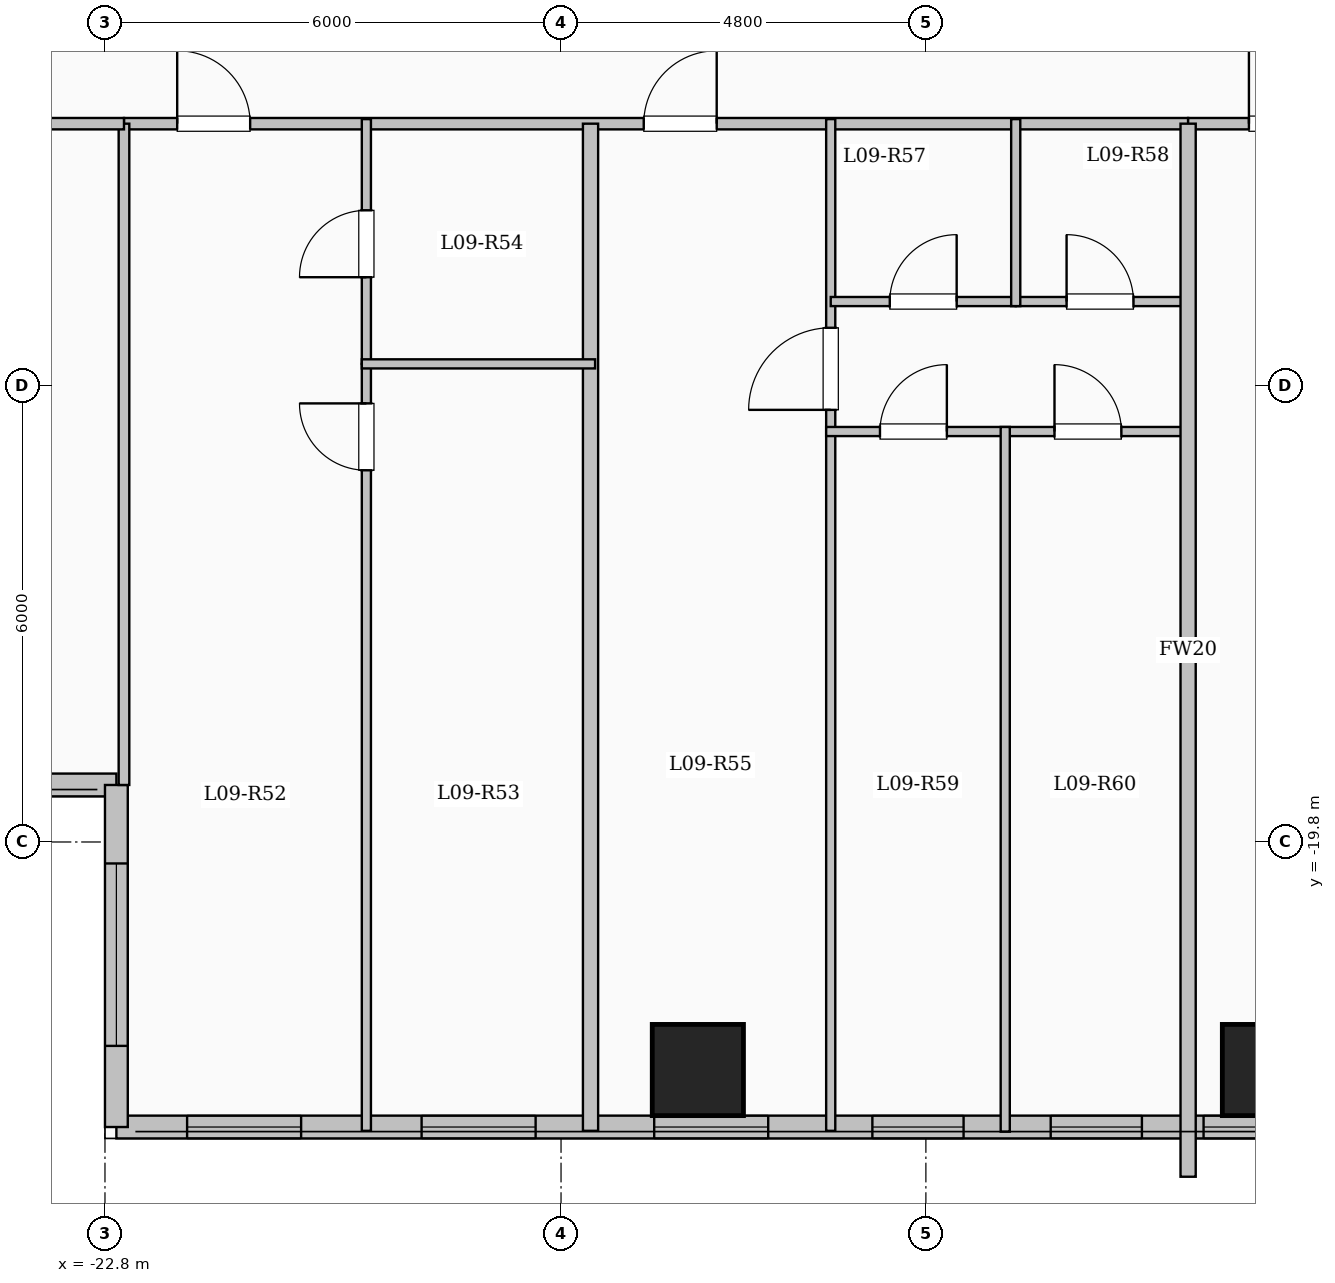
"""IFC4 building model, lengths in metres.
Left out: names, types, materials, properties, quantities, classifications, styles, units other than length and angle.
Written with IfcOpenShell. Run it as: python <this file> out.ifc"""

import sys

from ifc_helpers import new_model, si_unit, direction, frame, frame_2d, origin, origin_2d, place, context, subcontext, project, spatial, rectangle, extrude, element, fill, save


model = new_model("IFC4")
c1 = context("Model", 3, precision=1e-05, world=origin(), true_north=direction((0.0, 1.0)))
c2 = subcontext(c1, "Body", "Model", "MODEL_VIEW")
j1 = project(units=[si_unit("LENGTHUNIT", "METRE"), si_unit("PLANEANGLEUNIT", "RADIAN")], contexts=[c1])
p1 = place(None, origin())
s1 = spatial("IfcSite", under=j1, at=p1, CompositionType="ELEMENT")
p2 = place(p1, origin())
s2 = spatial("IfcBuilding", under=s1, at=p2, CompositionType="ELEMENT")
p3 = place(p2, frame((0.0, 0.0, 37.4)))
s3 = spatial("IfcBuildingStorey", under=s2, at=p3, CompositionType="ELEMENT", Elevation=37.4)
for number, where, z_axis, x_axis in (
    (1, (-15.0, -22.8, 0.0), (0.0, 0.0, 1.0), (1.0, 0.0, 0.0)),
    (2, (-7.5, -22.8, 0.0), (0.0, 0.0, 1.0), (1.0, 0.0, 0.0)),
):
    element("IfcColumn", number, at=place(p3, frame(where, z_axis=z_axis, x_axis=x_axis)), inside=s3, PredefinedType="COLUMN", context=c2, shape_type="SweptSolid", body=[
        extrude(rectangle(XDim=1.2, YDim=1.2, at=origin_2d()), origin(), (0.0, 0.0, 1.0), 3.35),
    ])
p4 = place(p3, frame((-22.65, -19.05, 0.0), z_axis=(0.0, 0.0, 1.0), x_axis=(-1.0, 0.0, 0.0)))
e3 = element("IfcWall", 3, at=p4, inside=s3, PredefinedType="SOLIDWALL", context=c2, shape_type="SweptSolid", body=[
    extrude(rectangle(XDim=6.0, YDim=0.3, at=frame_2d((3.0, 0.0))), origin(), (0.0, 0.0, 1.0), 3.1),
])
p5 = place(p4, frame((1.775, 0.0, 0.9)))
e4 = element("IfcOpeningElement", 4, at=p5, cuts=e3, PredefinedType="OPENING", context=c2, shape_type="SweptSolid", body=[
    extrude(rectangle(XDim=2.4, YDim=1.8, at=frame_2d((1.2, 0.9))), frame((0.0, 0.16, 0.0), z_axis=(0.0, -1.0, 0.0), x_axis=(1.0, 0.0, 0.0)), (0.0, 0.0, 1.0), 0.32),
])
p6 = place(p3, frame((-7.35, -23.55, 0.0), z_axis=(0.0, 0.0, 1.0), x_axis=(-1.0, 0.0, 0.0)))
e5 = element("IfcWall", 5, at=p6, inside=s3, PredefinedType="SOLIDWALL", context=c2, shape_type="SweptSolid", body=[
    extrude(rectangle(XDim=15.3, YDim=0.3, at=frame_2d((7.65, 0.0))), origin(), (0.0, 0.0, 1.0), 3.1),
])
p7 = place(p6, frame((0.147, 0.0, 0.95)))
e6 = element("IfcOpeningElement", 6, at=p7, cuts=e5, PredefinedType="OPENING", context=c2, shape_type="SweptSolid", body=[
    extrude(rectangle(XDim=0.85, YDim=1.5, at=frame_2d((0.425, 0.75))), frame((0.0, 0.16, 0.0), z_axis=(0.0, -1.0, 0.0), x_axis=(1.0, 0.0, 0.0)), (0.0, 0.0, 1.0), 0.32),
])
p8 = place(p6, frame((1.808, 0.0, 0.95)))
e7 = element("IfcOpeningElement", 7, at=p8, cuts=e5, PredefinedType="OPENING", context=c2, shape_type="SweptSolid", body=[
    extrude(rectangle(XDim=1.2, YDim=1.5, at=frame_2d((0.6, 0.75))), frame((0.0, 0.16, 0.0), z_axis=(0.0, -1.0, 0.0), x_axis=(1.0, 0.0, 0.0)), (0.0, 0.0, 1.0), 0.32),
])
p9 = place(p6, frame((4.154, 0.0, 0.95)))
e8 = element("IfcOpeningElement", 8, at=p9, cuts=e5, PredefinedType="OPENING", context=c2, shape_type="SweptSolid", body=[
    extrude(rectangle(XDim=1.2, YDim=1.5, at=frame_2d((0.6, 0.75))), frame((0.0, 0.16, 0.0), z_axis=(0.0, -1.0, 0.0), x_axis=(1.0, 0.0, 0.0)), (0.0, 0.0, 1.0), 0.32),
])
p10 = place(p6, frame((6.724, 0.0, 0.9)))
e9 = element("IfcOpeningElement", 9, at=p10, cuts=e5, PredefinedType="OPENING", context=c2, shape_type="SweptSolid", body=[
    extrude(rectangle(XDim=1.5, YDim=1.65, at=frame_2d((0.75, 0.825))), frame((0.0, 0.16, 0.0), z_axis=(0.0, -1.0, 0.0), x_axis=(1.0, 0.0, 0.0)), (0.0, 0.0, 1.0), 0.32),
])
p11 = place(p6, frame((9.784, 0.0, 0.9)))
e10 = element("IfcOpeningElement", 10, at=p11, cuts=e5, PredefinedType="OPENING", context=c2, shape_type="SweptSolid", body=[
    extrude(rectangle(XDim=1.5, YDim=1.65, at=frame_2d((0.75, 0.825))), frame((0.0, 0.16, 0.0), z_axis=(0.0, -1.0, 0.0), x_axis=(1.0, 0.0, 0.0)), (0.0, 0.0, 1.0), 0.32),
])
p12 = place(p6, frame((12.869, 0.0, 0.9)))
e11 = element("IfcOpeningElement", 11, at=p12, cuts=e5, PredefinedType="OPENING", context=c2, shape_type="SweptSolid", body=[
    extrude(rectangle(XDim=1.5, YDim=1.65, at=frame_2d((0.75, 0.825))), frame((0.0, 0.16, 0.0), z_axis=(0.0, -1.0, 0.0), x_axis=(1.0, 0.0, 0.0)), (0.0, 0.0, 1.0), 0.32),
])
p13 = place(p3, frame((-22.65, -23.55, 0.0), z_axis=(0.0, 0.0, 1.0), x_axis=(0.0, 1.0, 0.0)))
e12 = element("IfcWall", 12, at=p13, inside=s3, PredefinedType="SOLIDWALL", context=c2, shape_type="SweptSolid", body=[
    extrude(rectangle(XDim=4.5, YDim=0.3, at=frame_2d((2.25, 0.0))), origin(), (0.0, 0.0, 1.0), 3.1),
])
p14 = place(p13, frame((1.067, 0.0, 0.9)))
e13 = element("IfcOpeningElement", 13, at=p14, cuts=e12, PredefinedType="OPENING", context=c2, shape_type="SweptSolid", body=[
    extrude(rectangle(XDim=2.4, YDim=1.8, at=frame_2d((1.2, 0.9))), frame((0.0, 0.16, 0.0), z_axis=(0.0, -1.0, 0.0), x_axis=(1.0, 0.0, 0.0)), (0.0, 0.0, 1.0), 0.32),
])
p15 = place(p3, frame((-22.55, -10.35, 0.0), z_axis=(0.0, 0.0, 1.0), x_axis=(1.0, 0.0, 0.0)))
e14 = element("IfcWall", 14, at=p15, inside=s3, PredefinedType="PARTITIONING", context=c2, shape_type="SweptSolid", body=[
    extrude(rectangle(XDim=14.0, YDim=0.15, at=frame_2d((7.0, 0.0))), origin(), (0.0, 0.0, 1.0), 3.1),
])
p16 = place(p15, frame((0.7, 0.0, 0.0)))
e15 = element("IfcOpeningElement", 15, at=p16, cuts=e14, PredefinedType="OPENING", context=c2, shape_type="SweptSolid", body=[
    extrude(rectangle(XDim=0.96, YDim=2.15, at=frame_2d((0.48, 1.075))), frame((0.0, 0.085, 0.0), z_axis=(0.0, -1.0, 0.0), x_axis=(1.0, 0.0, 0.0)), (0.0, 0.0, 1.0), 0.17),
])
p17 = place(p15, frame((6.838, 0.0, 0.0)))
e16 = element("IfcOpeningElement", 16, at=p17, cuts=e14, PredefinedType="OPENING", context=c2, shape_type="SweptSolid", body=[
    extrude(rectangle(XDim=0.96, YDim=2.15, at=frame_2d((0.48, 1.075))), frame((0.0, 0.085, 0.0), z_axis=(0.0, -1.0, 0.0), x_axis=(1.0, 0.0, 0.0)), (0.0, 0.0, 1.0), 0.17),
])
p18 = place(p3, frame((-8.55, -10.35, 0.0), z_axis=(0.0, 0.0, 1.0), x_axis=(1.0, 0.0, 0.0)))
e17 = element("IfcWall", 17, at=p18, inside=s3, PredefinedType="PARTITIONING", context=c2, shape_type="SweptSolid", body=[
    extrude(rectangle(XDim=17.1, YDim=0.15, at=frame_2d((8.55, 0.0))), origin(), (0.0, 0.0, 1.0), 3.1),
])
p19 = place(p18, frame((0.8, 0.0, 0.0)))
e18 = element("IfcOpeningElement", 18, at=p19, cuts=e17, PredefinedType="OPENING", context=c2, shape_type="SweptSolid", body=[
    extrude(rectangle(XDim=0.96, YDim=2.15, at=frame_2d((0.48, 1.075))), frame((0.0, 0.085, 0.0), z_axis=(0.0, -1.0, 0.0), x_axis=(1.0, 0.0, 0.0)), (0.0, 0.0, 1.0), 0.17),
])
p20 = place(p3, frame((-16.412, -23.6, 0.0), z_axis=(0.0, 0.0, 1.0), x_axis=(0.0, 1.0, 0.0)))
e19 = element("IfcWall", 19, at=p20, inside=s3, PredefinedType="SOLIDWALL", context=c2, shape_type="SweptSolid", body=[
    extrude(rectangle(XDim=13.25, YDim=0.2, at=frame_2d((6.625, 0.0))), origin(), (0.0, 0.0, 1.0), 3.1),
])
p21 = place(p3, frame((-19.361, -23.6, 0.0), z_axis=(0.0, 0.0, 1.0), x_axis=(0.0, 1.0, 0.0)))
e20 = element("IfcWall", 20, at=p21, inside=s3, PredefinedType="PARTITIONING", context=c2, shape_type="SweptSolid", body=[
    extrude(rectangle(XDim=10.09, YDim=0.12, at=frame_2d((5.045, 0.0))), origin(), (0.0, 0.0, 1.0), 3.1),
])
p22 = place(p21, frame((8.69, 0.0, 0.0)))
e21 = element("IfcOpeningElement", 21, at=p22, cuts=e20, PredefinedType="OPENING", context=c2, shape_type="SweptSolid", body=[
    extrude(rectangle(XDim=0.88, YDim=2.1, at=frame_2d((0.44, 1.05))), frame((0.0, 0.07, 0.0), z_axis=(0.0, -1.0, 0.0), x_axis=(1.0, 0.0, 0.0)), (0.0, 0.0, 1.0), 0.14),
])
p23 = place(p3, frame((-19.361, -13.51, 0.0), z_axis=(0.0, 0.0, 1.0), x_axis=(0.0, 1.0, 0.0)))
e22 = element("IfcWall", 22, at=p23, inside=s3, PredefinedType="PARTITIONING", context=c2, shape_type="SweptSolid", body=[
    extrude(rectangle(XDim=3.22, YDim=0.12, at=frame_2d((1.61, 0.0))), origin(), (0.0, 0.0, 1.0), 3.1),
])
p24 = place(p23, frame((1.14, 0.0, 0.0)))
e23 = element("IfcOpeningElement", 23, at=p24, cuts=e22, PredefinedType="OPENING", context=c2, shape_type="SweptSolid", body=[
    extrude(rectangle(XDim=0.88, YDim=2.1, at=frame_2d((0.44, 1.05))), frame((0.0, 0.07, 0.0), z_axis=(0.0, -1.0, 0.0), x_axis=(1.0, 0.0, 0.0)), (0.0, 0.0, 1.0), 0.14),
])
p25 = place(p3, frame((-19.421, -13.51, 0.0), z_axis=(0.0, 0.0, 1.0), x_axis=(1.0, 0.0, 0.0)))
e24 = element("IfcWall", 24, at=p25, inside=s3, PredefinedType="PARTITIONING", context=c2, shape_type="SweptSolid", body=[
    extrude(rectangle(XDim=3.069, YDim=0.12, at=frame_2d((1.534, 0.0))), origin(), (0.0, 0.0, 1.0), 3.1),
])
p26 = place(p3, frame((-13.252, -23.6, 0.0), z_axis=(0.0, 0.0, 1.0), x_axis=(0.0, 1.0, 0.0)))
e25 = element("IfcWall", 25, at=p26, inside=s3, PredefinedType="PARTITIONING", context=c2, shape_type="SweptSolid", body=[
    extrude(rectangle(XDim=13.31, YDim=0.12, at=frame_2d((6.655, 0.0))), origin(), (0.0, 0.0, 1.0), 3.1),
])
p27 = place(p26, frame((9.485, 0.0, 0.0)))
e26 = element("IfcOpeningElement", 26, at=p27, cuts=e25, PredefinedType="OPENING", context=c2, shape_type="SweptSolid", body=[
    extrude(rectangle(XDim=1.08, YDim=2.15, at=frame_2d((0.54, 1.075))), frame((0.0, 0.07, 0.0), z_axis=(0.0, -1.0, 0.0), x_axis=(1.0, 0.0, 0.0)), (0.0, 0.0, 1.0), 0.14),
])
p28 = place(p3, frame((-13.252, -12.69, 0.0), z_axis=(0.0, 0.0, 1.0), x_axis=(1.0, 0.0, 0.0)))
e27 = element("IfcWall", 27, at=p28, inside=s3, PredefinedType="PARTITIONING", context=c2, shape_type="SweptSolid", body=[
    extrude(rectangle(XDim=2.434, YDim=0.12, at=frame_2d((1.217, 0.0))), origin(), (0.0, 0.0, 1.0), 2.585),
])
p29 = place(p28, frame((0.777, 0.0, 0.0)))
e28 = element("IfcOpeningElement", 28, at=p29, cuts=e27, PredefinedType="OPENING", context=c2, shape_type="SweptSolid", body=[
    extrude(rectangle(XDim=0.88, YDim=2.1, at=frame_2d((0.44, 1.05))), frame((0.0, 0.07, 0.0), z_axis=(0.0, -1.0, 0.0), x_axis=(1.0, 0.0, 0.0)), (0.0, 0.0, 1.0), 0.14),
])
p30 = place(p3, frame((-10.818, -12.69, 0.0), z_axis=(0.0, 0.0, 1.0), x_axis=(1.0, 0.0, 0.0)))
e29 = element("IfcWall", 29, at=p30, inside=s3, PredefinedType="PARTITIONING", context=c2, shape_type="SweptSolid", body=[
    extrude(rectangle(XDim=2.218, YDim=0.12, at=frame_2d((1.109, 0.0))), origin(), (0.0, 0.0, 1.0), 2.585),
])
p31 = place(p30, frame((0.669, 0.0, 0.0)))
e30 = element("IfcOpeningElement", 30, at=p31, cuts=e29, PredefinedType="OPENING", context=c2, shape_type="SweptSolid", body=[
    extrude(rectangle(XDim=0.88, YDim=2.1, at=frame_2d((0.44, 1.05))), frame((0.0, 0.07, 0.0), z_axis=(0.0, -1.0, 0.0), x_axis=(1.0, 0.0, 0.0)), (0.0, 0.0, 1.0), 0.14),
])
p32 = place(p3, frame((-13.312, -14.4, 0.0), z_axis=(0.0, 0.0, 1.0), x_axis=(1.0, 0.0, 0.0)))
e31 = element("IfcWall", 31, at=p32, inside=s3, PredefinedType="PARTITIONING", context=c2, shape_type="SweptSolid", body=[
    extrude(rectangle(XDim=4.772, YDim=0.12, at=frame_2d((2.386, 0.0))), origin(), (0.0, 0.0, 1.0), 3.1),
])
p33 = place(p32, frame((0.708, 0.0, 0.0)))
e32 = element("IfcOpeningElement", 32, at=p33, cuts=e31, PredefinedType="OPENING", context=c2, shape_type="SweptSolid", body=[
    extrude(rectangle(XDim=0.88, YDim=2.1, at=frame_2d((0.44, 1.05))), frame((0.0, 0.07, 0.0), z_axis=(0.0, -1.0, 0.0), x_axis=(1.0, 0.0, 0.0)), (0.0, 0.0, 1.0), 0.14),
])
p34 = place(p32, frame((3.004, 0.0, 0.0)))
e33 = element("IfcOpeningElement", 33, at=p34, cuts=e31, PredefinedType="OPENING", context=c2, shape_type="SweptSolid", body=[
    extrude(rectangle(XDim=0.88, YDim=2.1, at=frame_2d((0.44, 1.05))), frame((0.0, 0.07, 0.0), z_axis=(0.0, -1.0, 0.0), x_axis=(1.0, 0.0, 0.0)), (0.0, 0.0, 1.0), 0.14),
])
p35 = place(p3, frame((-10.818, -12.75, 0.0), z_axis=(0.0, 0.0, 1.0), x_axis=(0.0, 1.0, 0.0)))
e34 = element("IfcWall", 34, at=p35, inside=s3, PredefinedType="PARTITIONING", context=c2, shape_type="SweptSolid", body=[
    extrude(rectangle(XDim=2.46, YDim=0.12, at=frame_2d((1.23, 0.0))), origin(), (0.0, 0.0, 1.0), 3.1),
])
p36 = place(p3, frame((-10.956, -23.611, 0.0), z_axis=(0.0, 0.0, 1.0), x_axis=(0.0, 1.0, 0.0)))
e35 = element("IfcWall", 35, at=p36, inside=s3, PredefinedType="PARTITIONING", context=c2, shape_type="SweptSolid", body=[
    extrude(rectangle(XDim=9.271, YDim=0.12, at=frame_2d((4.635, 0.0))), origin(), (0.0, 0.0, 1.0), 3.1),
])
p37 = place(p3, frame((-8.55, -24.204, 0.0), z_axis=(0.0, 0.0, 1.0), x_axis=(0.0, 1.0, 0.0)))
e36 = element("IfcWall", 36, at=p37, inside=s3, PredefinedType="SOLIDWALL", context=c2, shape_type="SweptSolid", body=[
    extrude(rectangle(XDim=13.854, YDim=0.2, at=frame_2d((6.927, 0.0))), origin(), (0.0, 0.0, 1.0), 3.1),
])
p38 = place(p3, frame((-22.55, -19.05, 0.0), z_axis=(0.0, 0.0, 1.0), x_axis=(0.0, 1.0, 0.0)))
e37 = element("IfcWall", 37, at=p38, inside=s3, PredefinedType="PARTITIONING", context=c2, shape_type="SweptSolid", body=[
    extrude(rectangle(XDim=8.7, YDim=0.14, at=frame_2d((4.35, 0.0))), origin(), (0.0, 0.0, 1.0), 3.1),
])
p39 = place(p3, frame((-28.68, -10.35, 0.0), z_axis=(0.0, 0.0, 1.0), x_axis=(1.0, 0.0, 0.0)))
e38 = element("IfcWall", 38, at=p39, inside=s3, PredefinedType="PARTITIONING", context=c2, shape_type="SweptSolid", body=[
    extrude(rectangle(XDim=6.13, YDim=0.15, at=frame_2d((3.065, 0.0))), origin(), (0.0, 0.0, 1.0), 3.1),
])
p40 = place(p39, frame((2.59, 0.0, 0.0)))
e39 = element("IfcOpeningElement", 39, at=p40, cuts=e38, PredefinedType="OPENING", context=c2, shape_type="SweptSolid", body=[
    extrude(rectangle(XDim=0.95, YDim=2.15, at=frame_2d((0.475, 1.075))), frame((0.0, 0.085, 0.0), z_axis=(0.0, -1.0, 0.0), x_axis=(1.0, 0.0, 0.0)), (0.0, 0.0, 1.0), 0.17),
])
p41 = place(p7, origin())
e40 = element("IfcWindow", 40, at=p41, inside=s3, PartitioningType="SINGLE_PANEL", PredefinedType="WINDOW", context=c2, shape_type="SweptSolid", body=[
    extrude(rectangle(XDim=0.85, YDim=1.5, at=frame_2d((0.425, 0.75))), frame((0.0, 0.03, 0.0), z_axis=(0.0, -1.0, 0.0), x_axis=(1.0, 0.0, 0.0)), (0.0, 0.0, 1.0), 0.06),
])
fill(e6, e40)
p42 = place(p8, origin())
e41 = element("IfcWindow", 41, at=p42, inside=s3, PartitioningType="SINGLE_PANEL", PredefinedType="WINDOW", context=c2, shape_type="SweptSolid", body=[
    extrude(rectangle(XDim=1.2, YDim=1.5, at=frame_2d((0.6, 0.75))), frame((0.0, 0.03, 0.0), z_axis=(0.0, -1.0, 0.0), x_axis=(1.0, 0.0, 0.0)), (0.0, 0.0, 1.0), 0.06),
])
fill(e7, e41)
p43 = place(p9, origin())
e42 = element("IfcWindow", 42, at=p43, inside=s3, PartitioningType="SINGLE_PANEL", PredefinedType="WINDOW", context=c2, shape_type="SweptSolid", body=[
    extrude(rectangle(XDim=1.2, YDim=1.5, at=frame_2d((0.6, 0.75))), frame((0.0, 0.03, 0.0), z_axis=(0.0, -1.0, 0.0), x_axis=(1.0, 0.0, 0.0)), (0.0, 0.0, 1.0), 0.06),
])
fill(e8, e42)
p44 = place(p10, origin())
e43 = element("IfcWindow", 43, at=p44, inside=s3, PartitioningType="SINGLE_PANEL", PredefinedType="WINDOW", context=c2, shape_type="SweptSolid", body=[
    extrude(rectangle(XDim=1.5, YDim=1.65, at=frame_2d((0.75, 0.825))), frame((0.0, 0.03, 0.0), z_axis=(0.0, -1.0, 0.0), x_axis=(1.0, 0.0, 0.0)), (0.0, 0.0, 1.0), 0.06),
])
fill(e9, e43)
p45 = place(p11, origin())
e44 = element("IfcWindow", 44, at=p45, inside=s3, PartitioningType="SINGLE_PANEL", PredefinedType="WINDOW", context=c2, shape_type="SweptSolid", body=[
    extrude(rectangle(XDim=1.5, YDim=1.65, at=frame_2d((0.75, 0.825))), frame((0.0, 0.03, 0.0), z_axis=(0.0, -1.0, 0.0), x_axis=(1.0, 0.0, 0.0)), (0.0, 0.0, 1.0), 0.06),
])
fill(e10, e44)
p46 = place(p12, origin())
e45 = element("IfcWindow", 45, at=p46, inside=s3, PartitioningType="SINGLE_PANEL", PredefinedType="WINDOW", context=c2, shape_type="SweptSolid", body=[
    extrude(rectangle(XDim=1.5, YDim=1.65, at=frame_2d((0.75, 0.825))), frame((0.0, 0.03, 0.0), z_axis=(0.0, -1.0, 0.0), x_axis=(1.0, 0.0, 0.0)), (0.0, 0.0, 1.0), 0.06),
])
fill(e11, e45)
p47 = place(p14, origin())
e46 = element("IfcWindow", 46, at=p47, inside=s3, PartitioningType="SINGLE_PANEL", PredefinedType="WINDOW", context=c2, shape_type="SweptSolid", body=[
    extrude(rectangle(XDim=2.4, YDim=1.8, at=frame_2d((1.2, 0.9))), frame((0.0, 0.03, 0.0), z_axis=(0.0, -1.0, 0.0), x_axis=(1.0, 0.0, 0.0)), (0.0, 0.0, 1.0), 0.06),
])
fill(e13, e46)
p48 = place(p16, origin())
e47 = element("IfcDoor", 47, at=p48, inside=s3, OperationType="SINGLE_SWING_LEFT", PredefinedType="DOOR", context=c2, shape_type="SweptSolid", body=[
    extrude(rectangle(XDim=0.96, YDim=2.15, at=frame_2d((0.48, 1.075))), frame((0.0, 0.025, 0.0), z_axis=(0.0, -1.0, 0.0), x_axis=(1.0, 0.0, 0.0)), (0.0, 0.0, 1.0), 0.05),
])
fill(e15, e47)
p49 = place(p22, origin())
e48 = element("IfcDoor", 48, at=p49, inside=s3, OperationType="SINGLE_SWING_RIGHT", PredefinedType="DOOR", context=c2, shape_type="SweptSolid", body=[
    extrude(rectangle(XDim=0.88, YDim=2.1, at=frame_2d((0.44, 1.05))), frame((0.0, 0.025, 0.0), z_axis=(0.0, -1.0, 0.0), x_axis=(1.0, 0.0, 0.0)), (0.0, 0.0, 1.0), 0.05),
])
fill(e21, e48)
p50 = place(p24, origin())
e49 = element("IfcDoor", 49, at=p50, inside=s3, OperationType="SINGLE_SWING_LEFT", PredefinedType="DOOR", context=c2, shape_type="SweptSolid", body=[
    extrude(rectangle(XDim=0.88, YDim=2.1, at=frame_2d((0.44, 1.05))), frame((0.0, 0.025, 0.0), z_axis=(0.0, -1.0, 0.0), x_axis=(1.0, 0.0, 0.0)), (0.0, 0.0, 1.0), 0.05),
])
fill(e23, e49)
p51 = place(p17, origin())
e50 = element("IfcDoor", 50, at=p51, inside=s3, OperationType="SINGLE_SWING_RIGHT", PredefinedType="DOOR", context=c2, shape_type="SweptSolid", body=[
    extrude(rectangle(XDim=0.96, YDim=2.15, at=frame_2d((0.48, 1.075))), frame((0.0, 0.025, 0.0), z_axis=(0.0, -1.0, 0.0), x_axis=(1.0, 0.0, 0.0)), (0.0, 0.0, 1.0), 0.05),
])
fill(e16, e50)
p52 = place(p27, origin())
e51 = element("IfcDoor", 51, at=p52, inside=s3, OperationType="SINGLE_SWING_LEFT", PredefinedType="DOOR", context=c2, shape_type="SweptSolid", body=[
    extrude(rectangle(XDim=1.08, YDim=2.15, at=frame_2d((0.54, 1.075))), frame((0.0, 0.025, 0.0), z_axis=(0.0, -1.0, 0.0), x_axis=(1.0, 0.0, 0.0)), (0.0, 0.0, 1.0), 0.05),
])
fill(e26, e51)
p53 = place(p29, origin())
e52 = element("IfcDoor", 52, at=p53, inside=s3, OperationType="SINGLE_SWING_RIGHT", PredefinedType="DOOR", context=c2, shape_type="SweptSolid", body=[
    extrude(rectangle(XDim=0.88, YDim=2.1, at=frame_2d((0.44, 1.05))), frame((0.0, 0.025, 0.0), z_axis=(0.0, -1.0, 0.0), x_axis=(1.0, 0.0, 0.0)), (0.0, 0.0, 1.0), 0.05),
])
fill(e28, e52)
p54 = place(p31, origin())
e53 = element("IfcDoor", 53, at=p54, inside=s3, OperationType="SINGLE_SWING_LEFT", PredefinedType="DOOR", context=c2, shape_type="SweptSolid", body=[
    extrude(rectangle(XDim=0.88, YDim=2.1, at=frame_2d((0.44, 1.05))), frame((0.0, 0.025, 0.0), z_axis=(0.0, -1.0, 0.0), x_axis=(1.0, 0.0, 0.0)), (0.0, 0.0, 1.0), 0.05),
])
fill(e30, e53)
p55 = place(p33, origin())
e54 = element("IfcDoor", 54, at=p55, inside=s3, OperationType="SINGLE_SWING_RIGHT", PredefinedType="DOOR", context=c2, shape_type="SweptSolid", body=[
    extrude(rectangle(XDim=0.88, YDim=2.1, at=frame_2d((0.44, 1.05))), frame((0.0, 0.025, 0.0), z_axis=(0.0, -1.0, 0.0), x_axis=(1.0, 0.0, 0.0)), (0.0, 0.0, 1.0), 0.05),
])
fill(e32, e54)
p56 = place(p34, origin())
e55 = element("IfcDoor", 55, at=p56, inside=s3, OperationType="SINGLE_SWING_LEFT", PredefinedType="DOOR", context=c2, shape_type="SweptSolid", body=[
    extrude(rectangle(XDim=0.88, YDim=2.1, at=frame_2d((0.44, 1.05))), frame((0.0, 0.025, 0.0), z_axis=(0.0, -1.0, 0.0), x_axis=(1.0, 0.0, 0.0)), (0.0, 0.0, 1.0), 0.05),
])
fill(e33, e55)
p57 = place(p19, origin())
e56 = element("IfcDoor", 56, at=p57, inside=s3, OperationType="SINGLE_SWING_LEFT", PredefinedType="DOOR", context=c2, shape_type="SweptSolid", body=[
    extrude(rectangle(XDim=0.96, YDim=2.15, at=frame_2d((0.48, 1.075))), frame((0.0, 0.025, 0.0), z_axis=(0.0, -1.0, 0.0), x_axis=(1.0, 0.0, 0.0)), (0.0, 0.0, 1.0), 0.05),
])
fill(e18, e56)
save(model, sys.argv[1])
